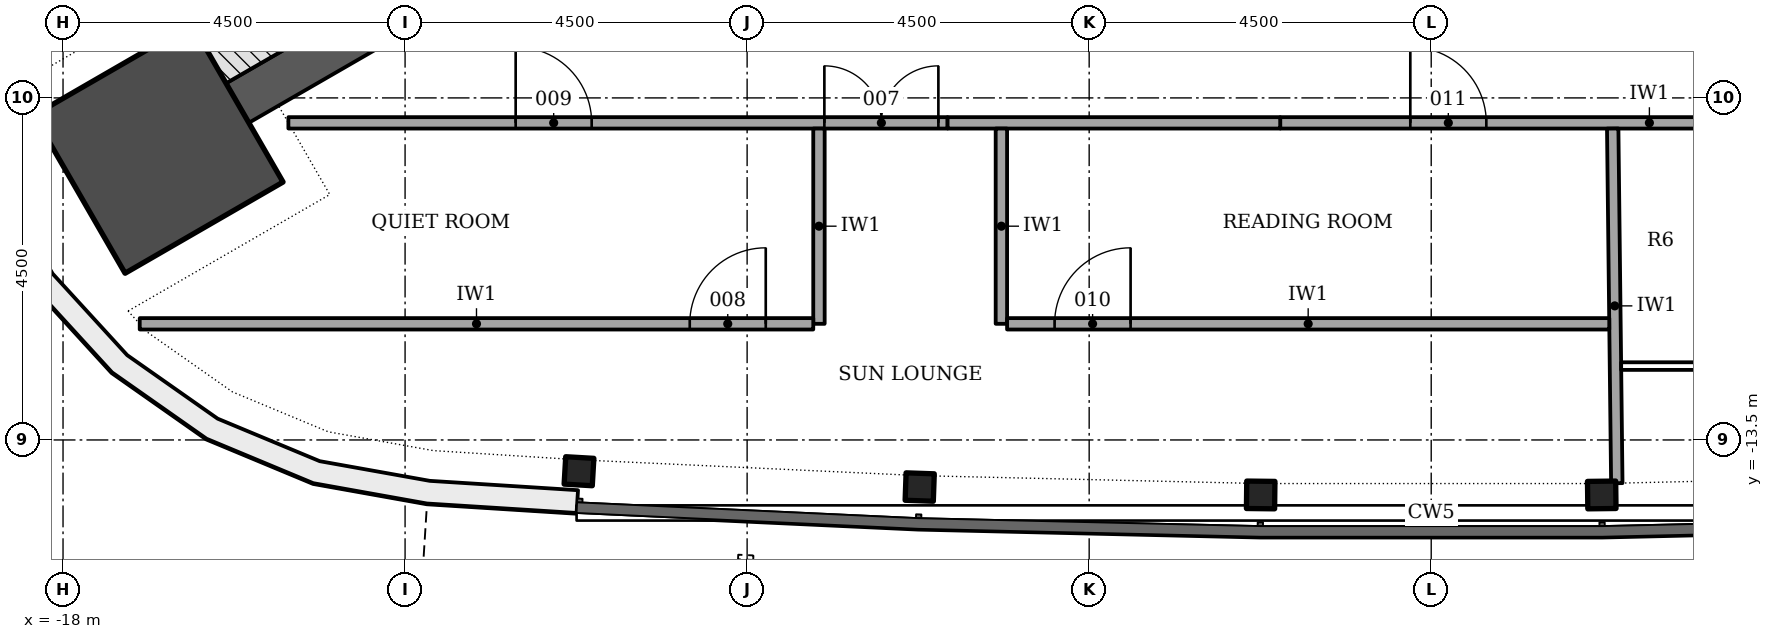
"""IFC4 building model, lengths in metres.
Left out: names, types, materials, properties, quantities, classifications, styles, units other than length and angle.
Written with IfcOpenShell. Run it as: python <this file> out.ifc"""

import sys

from ifc_helpers import new_model, si_unit, direction, frame, frame_2d, origin, origin_2d, place, context, subcontext, project, spatial, polyline, rectangle, i_section, outline, extrude, element, fill, save


model = new_model("IFC4")
c1 = context("Model", 3, precision=1e-05, world=origin(), true_north=direction((0.0, 1.0)))
c2 = subcontext(c1, "Body", "Model", "MODEL_VIEW")
j1 = project(units=[si_unit("LENGTHUNIT", "METRE"), si_unit("PLANEANGLEUNIT", "RADIAN")], contexts=[c1])
p1 = place(None, origin())
s1 = spatial("IfcSite", under=j1, at=p1, CompositionType="ELEMENT")
p2 = place(p1, origin())
s2 = spatial("IfcBuilding", under=s1, at=p2, CompositionType="ELEMENT")
p3 = place(p2, frame((0.0, 0.0, 263.4)))
s3 = spatial("IfcBuildingStorey", under=s2, at=p3, CompositionType="ELEMENT", Elevation=263.4)
p4 = place(p3, frame((-9.922, -5.728, -0.2), z_axis=(0.0, 0.0, 1.0), x_axis=(-0.866032176823, -0.499988268569, 0.0)))
e1 = element("IfcWall", 1, at=p4, inside=s3, PredefinedType="SHEAR", context=c2, shape_type="SweptSolid", body=[
    extrude(rectangle(XDim=6.678, YDim=0.6, at=frame_2d((3.339, 0.0))), origin(), (0.0, 0.0, 1.0), 3.6),
])
p5 = place(p3, frame((-16.745, -9.667, -0.2), z_axis=(0.0, 0.0, 1.0), x_axis=(-0.866025403784, -0.5, 0.0)))
e2 = element("IfcColumn", 2, at=p5, inside=s3, PredefinedType="COLUMN", context=c2, shape_type="SweptSolid", body=[
    extrude(rectangle(XDim=2.4, YDim=2.4, at=origin_2d()), origin(), (0.0, 0.0, 1.0), 3.6),
])
for number, where, z_axis, x_axis in (
    (3, (-11.212, -13.911, -0.2), (0.0, 0.0, 1.0), (0.998, -0.058, 0.0)),
    (4, (-6.729, -14.119, -0.2), (0.0, 0.0, 1.0), (0.999, -0.035, 0.0)),
    (5, (-2.244, -14.224, -0.2), (0.0, 0.0, 1.0), (1.0, -0.012, 0.0)),
    (6, (2.244, -14.224, -0.2), (0.0, 0.0, 1.0), (1.0, 0.012, 0.0)),
):
    element("IfcColumn", number, at=place(p3, frame(where, z_axis=z_axis, x_axis=x_axis)), inside=s3, PredefinedType="COLUMN", context=c2, shape_type="SweptSolid", body=[
        extrude(i_section(OverallWidth=0.371, OverallDepth=0.361, WebThickness=0.012, FlangeThickness=0.02, FilletRadius=0.015, at=origin_2d()), origin(), (0.0, 0.0, 1.0), 3.6),
    ])
p6 = place(p3, origin())
e7 = element("IfcWall", 7, at=p6, inside=s3, PredefinedType="NOTDEFINED", context=c2, shape_type="SweptSolid", body=[
    extrude(outline(polyline([(-18.145, -2.507), (-19.021, -4.273), (-19.538, -5.703), (-19.733, -7.21), (-19.599, -8.724), (-19.141, -10.174), (-18.381, -11.49), (-17.355, -12.611), (-16.111, -13.485), (-14.708, -14.069), (-13.211, -14.336), (-11.244, -14.46), (-11.225, -14.161), (-13.176, -14.038), (-14.623, -13.779), (-15.965, -13.22), (-17.156, -12.385), (-18.138, -11.312), (-18.865, -10.052), (-19.303, -8.665), (-19.432, -7.216), (-19.244, -5.774), (-18.745, -4.391), (-17.876, -2.64), (-18.145, -2.507)])), origin(), (0.0, 0.0, 1.0), 3.3),
])
p7 = place(p3, frame((-10.393, -4.912, -0.2), z_axis=(0.0, 0.0, 1.0), x_axis=(-0.866025486527, -0.499999856685, 0.0)))
e8 = element("IfcWall", 8, at=p7, inside=s3, PredefinedType="SHEAR", context=c2, shape_type="SweptSolid", body=[
    extrude(rectangle(XDim=6.679, YDim=1.286, at=frame_2d((3.339, 0.0))), origin(), (0.0, 0.0, 1.0), 3.6),
])
p8 = place(p3, frame((-15.035, -9.328, 0.0), z_axis=(0.0, 0.0, 1.0), x_axis=(1.0, 0.0, 0.0)))
e9 = element("IfcWall", 9, at=p8, inside=s3, PredefinedType="PARTITIONING", context=c2, shape_type="SweptSolid", body=[
    extrude(rectangle(XDim=8.673, YDim=0.15, at=frame_2d((4.336, 0.0))), origin(), (0.0, 0.0, 1.0), 2.852),
])
p9 = place(p8, frame((7.052, 0.0, 0.0)))
e10 = element("IfcOpeningElement", 10, at=p9, cuts=e9, PredefinedType="OPENING", context=c2, shape_type="SweptSolid", body=[
    extrude(rectangle(XDim=1.5, YDim=2.1, at=frame_2d((0.75, 1.05))), frame((0.0, 0.085, 0.0), z_axis=(0.0, -1.0, 0.0), x_axis=(1.0, 0.0, 0.0)), (0.0, 0.0, 1.0), 0.17),
])
p10 = place(p8, frame((2.99, 0.0, 0.0)))
e11 = element("IfcOpeningElement", 11, at=p10, cuts=e9, PredefinedType="OPENING", context=c2, shape_type="SweptSolid", body=[
    extrude(rectangle(XDim=1.0, YDim=2.1, at=frame_2d((0.5, 1.05))), frame((0.0, 0.085, 0.0), z_axis=(0.0, -1.0, 0.0), x_axis=(1.0, 0.0, 0.0)), (0.0, 0.0, 1.0), 0.17),
])
p11 = place(p3, frame((-1.987, -9.328, 0.0), z_axis=(0.0, 0.0, 1.0), x_axis=(1.0, 0.0, 0.0)))
e12 = element("IfcWall", 12, at=p11, inside=s3, PredefinedType="PARTITIONING", context=c2, shape_type="SweptSolid", body=[
    extrude(rectangle(XDim=9.714, YDim=0.15, at=frame_2d((4.857, 0.0))), origin(), (0.0, 0.0, 1.0), 2.852),
])
p12 = place(p11, frame((1.712, 0.0, 0.0)))
e13 = element("IfcOpeningElement", 13, at=p12, cuts=e12, PredefinedType="OPENING", context=c2, shape_type="SweptSolid", body=[
    extrude(rectangle(XDim=1.0, YDim=2.1, at=frame_2d((0.5, 1.05))), frame((0.0, 0.085, 0.0), z_axis=(0.0, -1.0, 0.0), x_axis=(1.0, 0.0, 0.0)), (0.0, 0.0, 1.0), 0.17),
])
p13 = place(p11, frame((7.613, 0.0, 0.0)))
e14 = element("IfcOpeningElement", 14, at=p13, cuts=e12, PredefinedType="OPENING", context=c2, shape_type="SweptSolid", body=[
    extrude(rectangle(XDim=1.0, YDim=2.1, at=frame_2d((0.5, 1.05))), frame((0.0, 0.085, 0.0), z_axis=(0.0, -1.0, 0.0), x_axis=(1.0, 0.0, 0.0)), (0.0, 0.0, 1.0), 0.17),
])
p14 = place(p3, frame((-6.363, -9.328, 0.0), z_axis=(0.0, 0.0, 1.0), x_axis=(1.0, 0.0, 0.0)))
e15 = element("IfcWall", 15, at=p14, inside=s3, PredefinedType="PARTITIONING", context=c2, shape_type="SweptSolid", body=[
    extrude(rectangle(XDim=4.376, YDim=0.15, at=frame_2d((2.188, 0.0))), origin(), (0.0, 0.0, 1.0), 2.852),
])
p15 = place(p3, frame((2.442, -14.069, 0.0), z_axis=(0.0, 0.0, 1.0), x_axis=(-0.011616170678, 0.999932530013, 0.0)))
e16 = element("IfcWall", 16, at=p15, inside=s3, PredefinedType="PARTITIONING", context=c2, shape_type="SweptSolid", body=[
    extrude(rectangle(XDim=4.666, YDim=0.15, at=frame_2d((2.333, 0.0))), origin(), (0.0, 0.0, 1.0), 3.4),
])
for number, where, z_axis, x_axis in (
    (17, (-8.055, -9.403, 0.0), (0.0, 0.0, 1.0), (0.0, -1.0, 0.0)),
    (18, (-5.655, -9.403, 0.0), (0.0, 0.0, 1.0), (0.0, -1.0, 0.0)),
):
    element("IfcWall", number, at=place(p3, frame(where, z_axis=z_axis, x_axis=x_axis)), inside=s3, PredefinedType="PARTITIONING", context=c2, shape_type="SweptSolid", body=[
        extrude(rectangle(XDim=2.569, YDim=0.15, at=frame_2d((1.284, 0.0))), origin(), (0.0, 0.0, 1.0), 3.4),
    ])
p16 = place(p3, frame((-16.991, -11.972, 0.0), z_axis=(0.0, 0.0, 1.0), x_axis=(1.0, 0.0, 0.0)))
e19 = element("IfcWall", 19, at=p16, inside=s3, PredefinedType="PARTITIONING", context=c2, shape_type="SweptSolid", body=[
    extrude(rectangle(XDim=8.861, YDim=0.15, at=frame_2d((4.431, 0.0))), origin(), (0.0, 0.0, 1.0), 2.852),
])
p17 = place(p16, frame((7.236, 0.0, 0.0)))
e20 = element("IfcOpeningElement", 20, at=p17, cuts=e19, PredefinedType="OPENING", context=c2, shape_type="SweptSolid", body=[
    extrude(rectangle(XDim=1.0, YDim=2.1, at=frame_2d((0.5, 1.05))), frame((0.0, 0.085, 0.0), z_axis=(0.0, -1.0, 0.0), x_axis=(1.0, 0.0, 0.0)), (0.0, 0.0, 1.0), 0.17),
])
p18 = place(p3, frame((-5.58, -11.972, 0.0), z_axis=(0.0, 0.0, 1.0), x_axis=(1.0, 0.0, 0.0)))
e21 = element("IfcWall", 21, at=p18, inside=s3, PredefinedType="PARTITIONING", context=c2, shape_type="SweptSolid", body=[
    extrude(rectangle(XDim=7.922, YDim=0.15, at=frame_2d((3.961, 0.0))), origin(), (0.0, 0.0, 1.0), 2.852),
])
p19 = place(p18, frame((0.625, 0.0, 0.0)))
e22 = element("IfcOpeningElement", 22, at=p19, cuts=e21, PredefinedType="OPENING", context=c2, shape_type="SweptSolid", body=[
    extrude(rectangle(XDim=1.0, YDim=2.1, at=frame_2d((0.5, 1.05))), frame((0.0, 0.085, 0.0), z_axis=(0.0, -1.0, 0.0), x_axis=(1.0, 0.0, 0.0)), (0.0, 0.0, 1.0), 0.17),
])
p20 = place(p3, frame((2.499, -12.528, 0.0), z_axis=(0.0, 0.0, 1.0), x_axis=(1.0, 0.0, 0.0)))
e23 = element("IfcWall", 23, at=p20, inside=s3, PredefinedType="PARTITIONING", context=c2, shape_type="SweptSolid", body=[
    extrude(rectangle(XDim=2.025, YDim=0.1, at=frame_2d((1.012, 0.0))), origin(), (0.0, 0.0, 1.0), 3.4),
])
p21 = place(p9, origin())
e24 = element("IfcDoor", 24, at=p21, inside=s3, OperationType="DOUBLE_DOOR_SINGLE_SWING", PredefinedType="DOOR", context=c2, shape_type="SweptSolid", body=[
    extrude(rectangle(XDim=1.5, YDim=2.1, at=frame_2d((0.75, 1.05))), frame((0.0, 0.025, 0.0), z_axis=(0.0, -1.0, 0.0), x_axis=(1.0, 0.0, 0.0)), (0.0, 0.0, 1.0), 0.05),
])
fill(e10, e24)
p22 = place(p17, origin())
e25 = element("IfcDoor", 25, at=p22, inside=s3, OperationType="SINGLE_SWING_RIGHT", PredefinedType="DOOR", context=c2, shape_type="SweptSolid", body=[
    extrude(rectangle(XDim=1.0, YDim=2.1, at=frame_2d((0.5, 1.05))), frame((0.0, 0.025, 0.0), z_axis=(0.0, -1.0, 0.0), x_axis=(1.0, 0.0, 0.0)), (0.0, 0.0, 1.0), 0.05),
])
fill(e20, e25)
p23 = place(p10, origin())
e26 = element("IfcDoor", 26, at=p23, inside=s3, OperationType="SINGLE_SWING_LEFT", PredefinedType="DOOR", context=c2, shape_type="SweptSolid", body=[
    extrude(rectangle(XDim=1.0, YDim=2.1, at=frame_2d((0.5, 1.05))), frame((0.0, 0.025, 0.0), z_axis=(0.0, -1.0, 0.0), x_axis=(1.0, 0.0, 0.0)), (0.0, 0.0, 1.0), 0.05),
])
fill(e11, e26)
p24 = place(p19, origin())
e27 = element("IfcDoor", 27, at=p24, inside=s3, OperationType="SINGLE_SWING_RIGHT", PredefinedType="DOOR", context=c2, shape_type="SweptSolid", body=[
    extrude(rectangle(XDim=1.0, YDim=2.1, at=frame_2d((0.5, 1.05))), frame((0.0, 0.025, 0.0), z_axis=(0.0, -1.0, 0.0), x_axis=(1.0, 0.0, 0.0)), (0.0, 0.0, 1.0), 0.05),
])
fill(e22, e27)
p25 = place(p12, origin())
e28 = element("IfcDoor", 28, at=p25, inside=s3, OperationType="SINGLE_SWING_LEFT", PredefinedType="DOOR", context=c2, shape_type="SweptSolid", body=[
    extrude(rectangle(XDim=1.0, YDim=2.1, at=frame_2d((0.5, 1.05))), frame((0.0, 0.025, 0.0), z_axis=(0.0, -1.0, 0.0), x_axis=(1.0, 0.0, 0.0)), (0.0, 0.0, 1.0), 0.05),
])
fill(e13, e28)
save(model, sys.argv[1])
